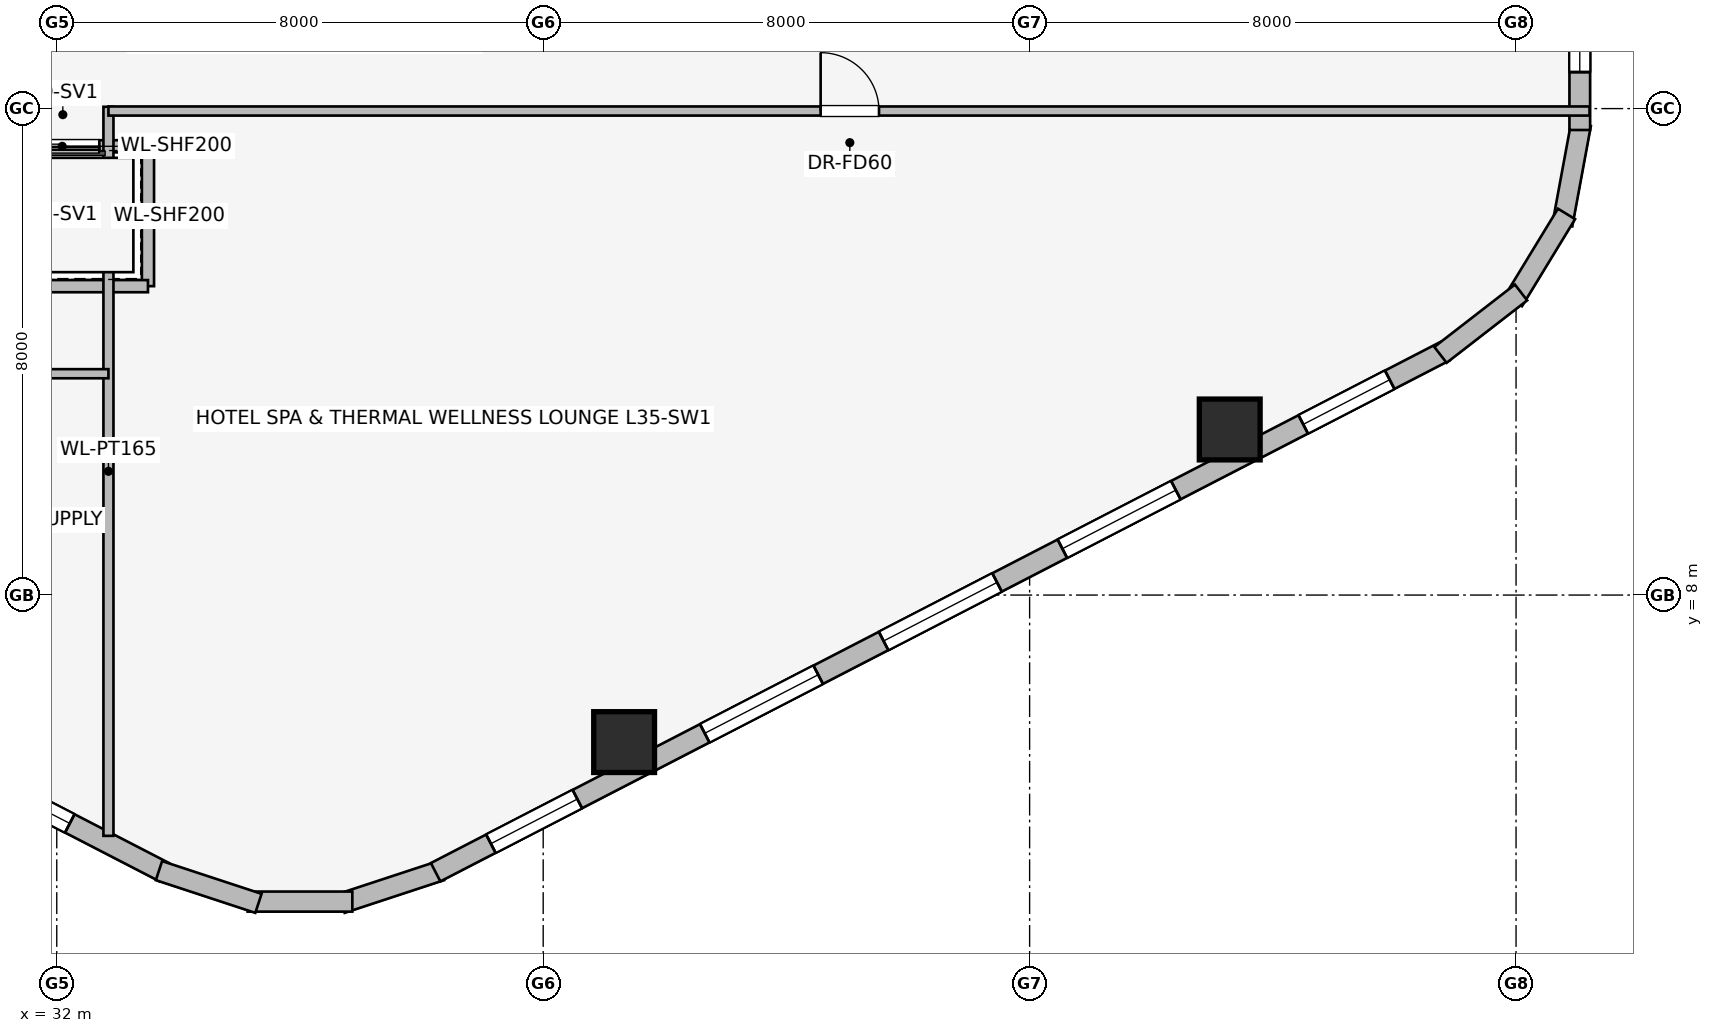
"""IFC4 building model, lengths in metres.
Left out: names, types, materials, properties, quantities, classifications, styles, units other than length and angle.
Written with IfcOpenShell. Run it as: python <this file> out.ifc"""

import sys

from ifc_helpers import new_model, si_unit, direction, frame, frame_2d, origin, origin_2d, place, context, subcontext, project, spatial, rectangle, extrude, element, fill, save


model = new_model("IFC4")
c1 = context("Model", 3, precision=1e-05, world=origin(), true_north=direction((0.0, 1.0)))
c2 = subcontext(c1, "Body", "Model", "MODEL_VIEW")
j1 = project(units=[si_unit("LENGTHUNIT", "METRE"), si_unit("PLANEANGLEUNIT", "RADIAN")], contexts=[c1])
p1 = place(None, origin())
s1 = spatial("IfcSite", under=j1, at=p1, CompositionType="ELEMENT")
p2 = place(p1, origin())
s2 = spatial("IfcBuilding", under=s1, at=p2, CompositionType="ELEMENT")
p3 = place(p2, frame((0.0, 0.0, 132.6)))
s3 = spatial("IfcBuildingStorey", under=s2, at=p3, CompositionType="ELEMENT", Elevation=132.6)
for number, where, z_axis, x_axis in (
    (1, (41.331, 5.582, 0.0), (0.0, 0.0, 1.0), (1.0, 0.0, 0.0)),
    (2, (51.291, 10.723, 0.0), (0.0, 0.0, 1.0), (1.0, 0.0, 0.0)),
):
    element("IfcColumn", number, at=place(p3, frame(where, z_axis=z_axis, x_axis=x_axis)), inside=s3, PredefinedType="COLUMN", context=c2, shape_type="SweptSolid", body=[
        extrude(rectangle(XDim=1.0, YDim=1.0, at=origin_2d()), origin(), (0.0, 0.0, 1.0), 3.45),
    ])
p4 = place(p3, frame((33.769, 3.442, 0.0), z_axis=(0.0, 0.0, 1.0), x_axis=(-0.888613612362, 0.458656568606, 0.0)))
e3 = element("IfcWall", 3, at=p4, inside=s3, PredefinedType="STANDARD", context=c2, shape_type="SweptSolid", body=[
    extrude(rectangle(XDim=18.681, YDim=0.34, at=frame_2d((9.34, 0.0))), origin(), (0.0, 0.0, 1.0), 3.19),
])
p5 = place(p4, frame((8.79, 0.0, 0.0)))
e4 = element("IfcOpeningElement", 4, at=p5, cuts=e3, PredefinedType="OPENING", context=c2, shape_type="SweptSolid", body=[
    extrude(rectangle(XDim=1.1, YDim=2.04, at=frame_2d((0.55, 1.02))), frame((0.0, 0.18, 0.0), z_axis=(0.0, -1.0, 0.0), x_axis=(1.0, 0.0, 0.0)), (0.0, 0.0, 1.0), 0.36),
])
p6 = place(p4, frame((1.75, 0.0, 0.75)))
e5 = element("IfcOpeningElement", 5, at=p6, cuts=e3, PredefinedType="OPENING", context=c2, shape_type="SweptSolid", body=[
    extrude(rectangle(XDim=1.05, YDim=1.4, at=frame_2d((0.525, 0.7))), frame((0.0, 0.18, 0.0), z_axis=(0.0, -1.0, 0.0), x_axis=(1.0, 0.0, 0.0)), (0.0, 0.0, 1.0), 0.36),
])
p7 = place(p4, frame((5.373, 0.0, 0.75)))
e6 = element("IfcOpeningElement", 6, at=p7, cuts=e3, PredefinedType="OPENING", context=c2, shape_type="SweptSolid", body=[
    extrude(rectangle(XDim=2.1, YDim=1.5, at=frame_2d((1.05, 0.75))), frame((0.0, 0.18, 0.0), z_axis=(0.0, -1.0, 0.0), x_axis=(1.0, 0.0, 0.0)), (0.0, 0.0, 1.0), 0.36),
])
p8 = place(p4, frame((11.774, 0.0, 0.75)))
e7 = element("IfcOpeningElement", 7, at=p8, cuts=e3, PredefinedType="OPENING", context=c2, shape_type="SweptSolid", body=[
    extrude(rectangle(XDim=1.6, YDim=1.55, at=frame_2d((0.8, 0.775))), frame((0.0, 0.18, 0.0), z_axis=(0.0, -1.0, 0.0), x_axis=(1.0, 0.0, 0.0)), (0.0, 0.0, 1.0), 0.36),
])
p9 = place(p4, frame((15.92, 0.0, 0.75)))
e8 = element("IfcOpeningElement", 8, at=p9, cuts=e3, PredefinedType="OPENING", context=c2, shape_type="SweptSolid", body=[
    extrude(rectangle(XDim=1.05, YDim=1.4, at=frame_2d((0.525, 0.7))), frame((0.0, 0.18, 0.0), z_axis=(0.0, -1.0, 0.0), x_axis=(1.0, 0.0, 0.0)), (0.0, 0.0, 1.0), 0.36),
])
for number, where, z_axis, x_axis in (
    (9, (38.319, 3.468, 0.0), (0.0, 0.0, 1.0), (-0.95, -0.312, 0.0)),
    (10, (36.861, 2.959, 0.0), (0.0, 0.0, 1.0), (-1.0, 0.0, 0.0)),
    (11, (35.317, 2.93, 0.0), (0.0, 0.0, 1.0), (-0.95, 0.312, 0.0)),
):
    element("IfcWall", number, at=place(p3, frame(where, z_axis=z_axis, x_axis=x_axis)), inside=s3, PredefinedType="STANDARD", context=c2, shape_type="SweptSolid", body=[
        extrude(rectangle(XDim=1.722, YDim=0.33, at=frame_2d((0.861, 0.0))), origin(), (0.0, 0.0, 1.0), 3.19),
    ])
p10 = place(p3, frame((54.831, 12.01, 0.0), z_axis=(0.0, 0.0, 1.0), x_axis=(-0.888613612362, -0.458656568606, 0.0)))
e12 = element("IfcWall", 12, at=p10, inside=s3, PredefinedType="STANDARD", context=c2, shape_type="SweptSolid", body=[
    extrude(rectangle(XDim=18.681, YDim=0.34, at=frame_2d((9.34, 0.0))), origin(), (0.0, 0.0, 1.0), 3.19),
])
p11 = place(p10, frame((1.023, 0.0, 0.75)))
e13 = element("IfcOpeningElement", 13, at=p11, cuts=e12, PredefinedType="OPENING", context=c2, shape_type="SweptSolid", body=[
    extrude(rectangle(XDim=1.6, YDim=1.55, at=frame_2d((0.8, 0.775))), frame((0.0, 0.18, 0.0), z_axis=(0.0, -1.0, 0.0), x_axis=(1.0, 0.0, 0.0)), (0.0, 0.0, 1.0), 0.36),
])
p12 = place(p10, frame((4.981, 0.0, 0.75)))
e14 = element("IfcOpeningElement", 14, at=p12, cuts=e12, PredefinedType="OPENING", context=c2, shape_type="SweptSolid", body=[
    extrude(rectangle(XDim=2.1, YDim=1.5, at=frame_2d((1.05, 0.75))), frame((0.0, 0.18, 0.0), z_axis=(0.0, -1.0, 0.0), x_axis=(1.0, 0.0, 0.0)), (0.0, 0.0, 1.0), 0.36),
])
p13 = place(p10, frame((8.29, 0.0, 0.75)))
e15 = element("IfcOpeningElement", 15, at=p13, cuts=e12, PredefinedType="OPENING", context=c2, shape_type="SweptSolid", body=[
    extrude(rectangle(XDim=2.1, YDim=1.5, at=frame_2d((1.05, 0.75))), frame((0.0, 0.18, 0.0), z_axis=(0.0, -1.0, 0.0), x_axis=(1.0, 0.0, 0.0)), (0.0, 0.0, 1.0), 0.36),
])
p14 = place(p10, frame((11.6, 0.0, 0.75)))
e16 = element("IfcOpeningElement", 16, at=p14, cuts=e12, PredefinedType="OPENING", context=c2, shape_type="SweptSolid", body=[
    extrude(rectangle(XDim=2.1, YDim=1.5, at=frame_2d((1.05, 0.75))), frame((0.0, 0.18, 0.0), z_axis=(0.0, -1.0, 0.0), x_axis=(1.0, 0.0, 0.0)), (0.0, 0.0, 1.0), 0.36),
])
p15 = place(p10, frame((16.058, 0.0, 0.75)))
e17 = element("IfcOpeningElement", 17, at=p15, cuts=e12, PredefinedType="OPENING", context=c2, shape_type="SweptSolid", body=[
    extrude(rectangle(XDim=1.6, YDim=1.55, at=frame_2d((0.8, 0.775))), frame((0.0, 0.18, 0.0), z_axis=(0.0, -1.0, 0.0), x_axis=(1.0, 0.0, 0.0)), (0.0, 0.0, 1.0), 0.36),
])
p16 = place(p3, frame((57.068, 15.742, 0.0), z_axis=(0.0, 0.0, 1.0), x_axis=(-0.181984991895, -0.983301308209, 0.0)))
e18 = element("IfcWall", 18, at=p16, inside=s3, PredefinedType="STANDARD", context=c2, shape_type="SweptSolid", body=[
    extrude(rectangle(XDim=1.677, YDim=0.33, at=frame_2d((0.838, 0.0))), origin(), (0.0, 0.0, 1.0), 3.19),
])
p17 = place(p3, frame((56.83, 14.268, 0.0), z_axis=(0.0, 0.0, 1.0), x_axis=(-0.520519429557, -0.853849824883, 0.0)))
e19 = element("IfcWall", 19, at=p17, inside=s3, PredefinedType="STANDARD", context=c2, shape_type="SweptSolid", body=[
    extrude(rectangle(XDim=1.677, YDim=0.33, at=frame_2d((0.839, 0.0))), origin(), (0.0, 0.0, 1.0), 3.19),
])
p18 = place(p3, frame((56.082, 12.976, 0.0), z_axis=(0.0, 0.0, 1.0), x_axis=(-0.790621329885, -0.612305408053, 0.0)))
e20 = element("IfcWall", 20, at=p18, inside=s3, PredefinedType="STANDARD", context=c2, shape_type="SweptSolid", body=[
    extrude(rectangle(XDim=1.676, YDim=0.33, at=frame_2d((0.838, 0.0))), origin(), (0.0, 0.0, 1.0), 3.19),
])
p19 = place(p3, frame((57.048, 32.352, 0.0), z_axis=(0.0, 0.0, 1.0), x_axis=(0.0, -1.0, 0.0)))
e21 = element("IfcWall", 21, at=p19, inside=s3, PredefinedType="STANDARD", context=c2, shape_type="SweptSolid", body=[
    extrude(rectangle(XDim=16.704, YDim=0.34, at=frame_2d((8.352, 0.0))), origin(), (0.0, 0.0, 1.0), 3.19),
])
p20 = place(p19, frame((0.992, 0.0, 0.75)))
e22 = element("IfcOpeningElement", 22, at=p20, cuts=e21, PredefinedType="OPENING", context=c2, shape_type="SweptSolid", body=[
    extrude(rectangle(XDim=1.05, YDim=1.4, at=frame_2d((0.525, 0.7))), frame((0.0, 0.18, 0.0), z_axis=(0.0, -1.0, 0.0), x_axis=(1.0, 0.0, 0.0)), (0.0, 0.0, 1.0), 0.36),
])
p21 = place(p19, frame((4.935, 0.0, 0.75)))
e23 = element("IfcOpeningElement", 23, at=p21, cuts=e21, PredefinedType="OPENING", context=c2, shape_type="SweptSolid", body=[
    extrude(rectangle(XDim=2.1, YDim=1.5, at=frame_2d((1.05, 0.75))), frame((0.0, 0.18, 0.0), z_axis=(0.0, -1.0, 0.0), x_axis=(1.0, 0.0, 0.0)), (0.0, 0.0, 1.0), 0.36),
])
p22 = place(p19, frame((9.919, 0.0, 0.75)))
e24 = element("IfcOpeningElement", 24, at=p22, cuts=e21, PredefinedType="OPENING", context=c2, shape_type="SweptSolid", body=[
    extrude(rectangle(XDim=1.6, YDim=1.55, at=frame_2d((0.8, 0.775))), frame((0.0, 0.18, 0.0), z_axis=(0.0, -1.0, 0.0), x_axis=(1.0, 0.0, 0.0)), (0.0, 0.0, 1.0), 0.36),
])
p23 = place(p19, frame((14.702, 0.0, 0.75)))
e25 = element("IfcOpeningElement", 25, at=p23, cuts=e21, PredefinedType="OPENING", context=c2, shape_type="SweptSolid", body=[
    extrude(rectangle(XDim=1.05, YDim=1.4, at=frame_2d((0.525, 0.7))), frame((0.0, 0.18, 0.0), z_axis=(0.0, -1.0, 0.0), x_axis=(1.0, 0.0, 0.0)), (0.0, 0.0, 1.0), 0.36),
])
p24 = place(p3, frame((33.5, 15.38, 0.0), z_axis=(0.0, 0.0, 1.0), x_axis=(-1.0, 0.0, 0.0)))
e26 = element("IfcWall", 26, at=p24, inside=s3, PredefinedType="PARTITIONING", context=c2, shape_type="SweptSolid", body=[
    extrude(rectangle(XDim=2.82, YDim=0.2, at=frame_2d((1.41, 0.0))), origin(), (0.0, 0.0, 1.0), 3.19),
])
p25 = place(p24, frame((0.8, 0.0, 0.0)))
e27 = element("IfcOpeningElement", 27, at=p25, cuts=e26, PredefinedType="OPENING", context=c2, shape_type="SweptSolid", body=[
    extrude(rectangle(XDim=1.2, YDim=2.2, at=frame_2d((0.6, 1.1))), frame((0.0, 0.11, 0.0), z_axis=(0.0, -1.0, 0.0), x_axis=(1.0, 0.0, 0.0)), (0.0, 0.0, 1.0), 0.22),
])
p26 = place(p3, frame((33.5, 13.08, 0.0), z_axis=(0.0, 0.0, 1.0), x_axis=(0.0, 1.0, 0.0)))
e28 = element("IfcWall", 28, at=p26, inside=s3, PredefinedType="PARTITIONING", context=c2, shape_type="SweptSolid", body=[
    extrude(rectangle(XDim=2.3, YDim=0.2, at=frame_2d((1.15, 0.0))), origin(), (0.0, 0.0, 1.0), 3.19),
])
p27 = place(p3, frame((30.879, 13.08, 0.0), z_axis=(0.0, 0.0, 1.0), x_axis=(1.0, 0.0, 0.0)))
e29 = element("IfcWall", 29, at=p27, inside=s3, PredefinedType="PARTITIONING", context=c2, shape_type="SweptSolid", body=[
    extrude(rectangle(XDim=2.621, YDim=0.2, at=frame_2d((1.311, 0.0))), origin(), (0.0, 0.0, 1.0), 3.19),
])
p28 = place(p3, frame((32.85, 4.04, 0.0), z_axis=(0.0, 0.0, 1.0), x_axis=(0.0, 1.0, 0.0)))
e30 = element("IfcWall", 30, at=p28, inside=s3, PredefinedType="PARTITIONING", context=c2, shape_type="SweptSolid", body=[
    extrude(rectangle(XDim=11.99, YDim=0.165, at=frame_2d((5.995, 0.0))), origin(), (0.0, 0.0, 1.0), 3.19),
])
p29 = place(p3, frame((18.126, 11.64, 0.0), z_axis=(0.0, 0.0, 1.0), x_axis=(1.0, 0.0, 0.0)))
e31 = element("IfcWall", 31, at=p29, inside=s3, PredefinedType="PARTITIONING", context=c2, shape_type="SweptSolid", body=[
    extrude(rectangle(XDim=14.724, YDim=0.15, at=frame_2d((7.362, 0.0))), origin(), (0.0, 0.0, 1.0), 3.19),
])
p30 = place(p29, frame((4.274, 0.0, 0.0)))
e32 = element("IfcOpeningElement", 32, at=p30, cuts=e31, PredefinedType="OPENING", context=c2, shape_type="SweptSolid", body=[
    extrude(rectangle(XDim=0.9, YDim=2.0, at=frame_2d((0.45, 1.0))), frame((0.0, 0.085, 0.0), z_axis=(0.0, -1.0, 0.0), x_axis=(1.0, 0.0, 0.0)), (0.0, 0.0, 1.0), 0.17),
])
p31 = place(p29, frame((7.724, 0.0, 0.0)))
e33 = element("IfcOpeningElement", 33, at=p31, cuts=e31, PredefinedType="OPENING", context=c2, shape_type="SweptSolid", body=[
    extrude(rectangle(XDim=0.9, YDim=2.0, at=frame_2d((0.45, 1.0))), frame((0.0, 0.085, 0.0), z_axis=(0.0, -1.0, 0.0), x_axis=(1.0, 0.0, 0.0)), (0.0, 0.0, 1.0), 0.17),
])
p32 = place(p3, frame((32.85, 15.96, 0.0), z_axis=(0.0, 0.0, 1.0), x_axis=(1.0, 0.0, 0.0)))
e34 = element("IfcWall", 34, at=p32, inside=s3, PredefinedType="PARTITIONING", context=c2, shape_type="SweptSolid", body=[
    extrude(rectangle(XDim=24.358, YDim=0.15, at=frame_2d((12.179, 0.0))), origin(), (0.0, 0.0, 1.0), 3.19),
])
p33 = place(p32, frame((11.713, 0.0, 0.0)))
e35 = element("IfcOpeningElement", 35, at=p33, cuts=e34, PredefinedType="OPENING", context=c2, shape_type="SweptSolid", body=[
    extrude(rectangle(XDim=0.96, YDim=2.0, at=frame_2d((0.48, 1.0))), frame((0.0, 0.085, 0.0), z_axis=(0.0, -1.0, 0.0), x_axis=(1.0, 0.0, 0.0)), (0.0, 0.0, 1.0), 0.17),
])
p34 = place(p6, origin())
e36 = element("IfcWindow", 36, at=p34, inside=s3, PartitioningType="SINGLE_PANEL", PredefinedType="WINDOW", context=c2, shape_type="SweptSolid", body=[
    extrude(rectangle(XDim=1.05, YDim=1.4, at=frame_2d((0.525, 0.7))), frame((0.0, 0.03, 0.0), z_axis=(0.0, -1.0, 0.0), x_axis=(1.0, 0.0, 0.0)), (0.0, 0.0, 1.0), 0.06),
])
fill(e5, e36)
p35 = place(p11, origin())
e37 = element("IfcWindow", 37, at=p35, inside=s3, PartitioningType="SINGLE_PANEL", PredefinedType="WINDOW", context=c2, shape_type="SweptSolid", body=[
    extrude(rectangle(XDim=1.6, YDim=1.55, at=frame_2d((0.8, 0.775))), frame((0.0, 0.03, 0.0), z_axis=(0.0, -1.0, 0.0), x_axis=(1.0, 0.0, 0.0)), (0.0, 0.0, 1.0), 0.06),
])
fill(e13, e37)
p36 = place(p12, origin())
e38 = element("IfcWindow", 38, at=p36, inside=s3, PartitioningType="SINGLE_PANEL", PredefinedType="WINDOW", context=c2, shape_type="SweptSolid", body=[
    extrude(rectangle(XDim=2.1, YDim=1.5, at=frame_2d((1.05, 0.75))), frame((0.0, 0.03, 0.0), z_axis=(0.0, -1.0, 0.0), x_axis=(1.0, 0.0, 0.0)), (0.0, 0.0, 1.0), 0.06),
])
fill(e14, e38)
p37 = place(p13, origin())
e39 = element("IfcWindow", 39, at=p37, inside=s3, PartitioningType="SINGLE_PANEL", PredefinedType="WINDOW", context=c2, shape_type="SweptSolid", body=[
    extrude(rectangle(XDim=2.1, YDim=1.5, at=frame_2d((1.05, 0.75))), frame((0.0, 0.03, 0.0), z_axis=(0.0, -1.0, 0.0), x_axis=(1.0, 0.0, 0.0)), (0.0, 0.0, 1.0), 0.06),
])
fill(e15, e39)
p38 = place(p14, origin())
e40 = element("IfcWindow", 40, at=p38, inside=s3, PartitioningType="SINGLE_PANEL", PredefinedType="WINDOW", context=c2, shape_type="SweptSolid", body=[
    extrude(rectangle(XDim=2.1, YDim=1.5, at=frame_2d((1.05, 0.75))), frame((0.0, 0.03, 0.0), z_axis=(0.0, -1.0, 0.0), x_axis=(1.0, 0.0, 0.0)), (0.0, 0.0, 1.0), 0.06),
])
fill(e16, e40)
p39 = place(p15, origin())
e41 = element("IfcWindow", 41, at=p39, inside=s3, PartitioningType="SINGLE_PANEL", PredefinedType="WINDOW", context=c2, shape_type="SweptSolid", body=[
    extrude(rectangle(XDim=1.6, YDim=1.55, at=frame_2d((0.8, 0.775))), frame((0.0, 0.03, 0.0), z_axis=(0.0, -1.0, 0.0), x_axis=(1.0, 0.0, 0.0)), (0.0, 0.0, 1.0), 0.06),
])
fill(e17, e41)
p40 = place(p23, origin())
e42 = element("IfcWindow", 42, at=p40, inside=s3, PartitioningType="SINGLE_PANEL", PredefinedType="WINDOW", context=c2, shape_type="SweptSolid", body=[
    extrude(rectangle(XDim=1.05, YDim=1.4, at=frame_2d((0.525, 0.7))), frame((0.0, 0.03, 0.0), z_axis=(0.0, -1.0, 0.0), x_axis=(1.0, 0.0, 0.0)), (0.0, 0.0, 1.0), 0.06),
])
fill(e25, e42)
p41 = place(p25, origin())
e43 = element("IfcDoor", 43, at=p41, inside=s3, OperationType="SLIDING_TO_RIGHT", PredefinedType="DOOR", context=c2, shape_type="SweptSolid", body=[
    extrude(rectangle(XDim=1.2, YDim=2.2, at=frame_2d((0.6, 1.1))), frame((0.0, 0.025, 0.0), z_axis=(0.0, -1.0, 0.0), x_axis=(1.0, 0.0, 0.0)), (0.0, 0.0, 1.0), 0.05),
])
fill(e27, e43)
p42 = place(p33, origin())
e44 = element("IfcDoor", 44, at=p42, inside=s3, OperationType="SINGLE_SWING_LEFT", PredefinedType="DOOR", context=c2, shape_type="SweptSolid", body=[
    extrude(rectangle(XDim=0.96, YDim=2.0, at=frame_2d((0.48, 1.0))), frame((0.0, 0.025, 0.0), z_axis=(0.0, -1.0, 0.0), x_axis=(1.0, 0.0, 0.0)), (0.0, 0.0, 1.0), 0.05),
])
fill(e35, e44)
save(model, sys.argv[1])
